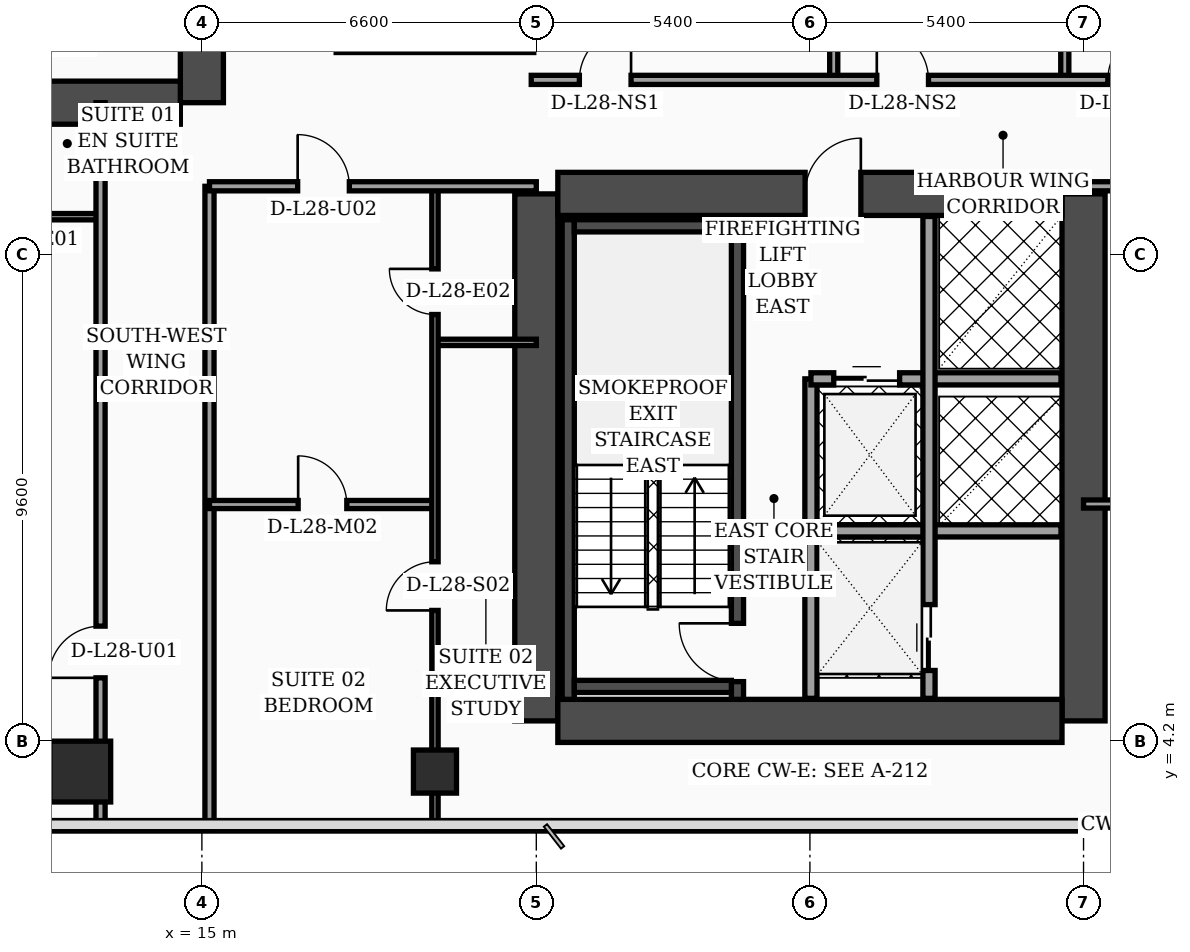
"""IFC4 building model, lengths in metres.
Left out: names, types, materials, properties, quantities, classifications, styles, units other than length and angle.
Written with IfcOpenShell. Run it as: python <this file> out.ifc"""

import sys

from ifc_helpers import new_model, si_unit, direction, frame, frame_2d, origin, origin_2d, place, context, subcontext, project, spatial, rectangle, hollow_rectangle, extrude, element, fill, save


model = new_model("IFC4")
c1 = context("Model", 3, precision=1e-05, world=origin(), true_north=direction((0.0, 1.0)))
c2 = subcontext(c1, "Body", "Model", "MODEL_VIEW")
j1 = project(units=[si_unit("LENGTHUNIT", "METRE"), si_unit("PLANEANGLEUNIT", "RADIAN")], contexts=[c1])
p1 = place(None, origin())
s1 = spatial("IfcSite", under=j1, at=p1, CompositionType="ELEMENT")
p2 = place(p1, origin())
s2 = spatial("IfcBuilding", under=s1, at=p2, CompositionType="ELEMENT")
p3 = place(p2, frame((0.0, 0.0, 116.4)))
s3 = spatial("IfcBuildingStorey", under=s2, at=p3, CompositionType="ELEMENT", Elevation=116.4)
p4 = place(p3, frame((15.0, 16.8, 0.0), z_axis=(0.0, 0.0, 1.0), x_axis=(0.0, 1.0, 0.0)))
e1 = element("IfcWall", 1, at=p4, inside=s3, PredefinedType="SHEAR", context=c2, shape_type="SweptSolid", body=[
    extrude(rectangle(XDim=21.6, YDim=0.85, at=frame_2d((10.8, 0.0))), origin(), (0.0, 0.0, 1.0), 3.56),
])
p5 = place(p4, frame((8.65, 0.0, 0.0)))
e2 = element("IfcOpeningElement", 2, at=p5, cuts=e1, PredefinedType="OPENING", context=c2, shape_type="SweptSolid", body=[
    extrude(rectangle(XDim=1.1, YDim=2.2, at=frame_2d((0.55, 1.1))), frame((0.0, 0.435, 0.0), z_axis=(0.0, -1.0, 0.0), x_axis=(1.0, 0.0, 0.0)), (0.0, 0.0, 1.0), 0.87),
])
p6 = place(p4, frame((10.85, 0.0, 0.0)))
e3 = element("IfcOpeningElement", 3, at=p6, cuts=e1, PredefinedType="OPENING", context=c2, shape_type="SweptSolid", body=[
    extrude(rectangle(XDim=1.1, YDim=2.2, at=frame_2d((0.55, 1.1))), frame((0.0, 0.435, 0.0), z_axis=(0.0, -1.0, 0.0), x_axis=(1.0, 0.0, 0.0)), (0.0, 0.0, 1.0), 0.87),
])
p7 = place(p4, frame((13.5, 0.0, 0.0)))
e4 = element("IfcOpeningElement", 4, at=p7, cuts=e1, PredefinedType="OPENING", context=c2, shape_type="SweptSolid", body=[
    extrude(rectangle(XDim=1.1, YDim=2.2, at=frame_2d((0.55, 1.1))), frame((0.0, 0.435, 0.0), z_axis=(0.0, -1.0, 0.0), x_axis=(1.0, 0.0, 0.0)), (0.0, 0.0, 1.0), 0.87),
])
p8 = place(p4, frame((16.15, 0.0, 0.0)))
e5 = element("IfcOpeningElement", 5, at=p8, cuts=e1, PredefinedType="OPENING", context=c2, shape_type="SweptSolid", body=[
    extrude(rectangle(XDim=1.1, YDim=2.2, at=frame_2d((0.55, 1.1))), frame((0.0, 0.435, 0.0), z_axis=(0.0, -1.0, 0.0), x_axis=(1.0, 0.0, 0.0)), (0.0, 0.0, 1.0), 0.87),
])
p9 = place(p3, frame((4.625, 16.8, 0.0), z_axis=(0.0, 0.0, 1.0), x_axis=(1.0, 0.0, 0.0)))
e6 = element("IfcWall", 6, at=p9, inside=s3, PredefinedType="SHEAR", context=c2, shape_type="SweptSolid", body=[
    extrude(rectangle(XDim=9.95, YDim=0.85, at=frame_2d((4.975, 0.0))), origin(), (0.0, 0.0, 1.0), 3.56),
])
for number, where, z_axis, x_axis in (
    (7, (21.6, 4.6, 0.0), (0.0, 0.0, 1.0), (0.0, 1.0, 0.0)),
    (8, (32.4, 4.6, 0.0), (0.0, 0.0, 1.0), (0.0, 1.0, 0.0)),
):
    element("IfcWall", number, at=place(p3, frame(where, z_axis=z_axis, x_axis=x_axis)), inside=s3, PredefinedType="SHEAR", context=c2, shape_type="SweptSolid", body=[
        extrude(rectangle(XDim=10.4, YDim=0.85, at=frame_2d((5.2, 0.0))), origin(), (0.0, 0.0, 1.0), 3.56),
    ])
p10 = place(p3, frame((22.025, 15.0, 0.0), z_axis=(0.0, 0.0, 1.0), x_axis=(1.0, 0.0, 0.0)))
e9 = element("IfcWall", 9, at=p10, inside=s3, PredefinedType="SHEAR", context=c2, shape_type="SweptSolid", body=[
    extrude(rectangle(XDim=9.95, YDim=0.85, at=frame_2d((4.975, 0.0))), origin(), (0.0, 0.0, 1.0), 3.56),
])
p11 = place(p10, frame((4.88, 0.0, 0.0)))
e10 = element("IfcOpeningElement", 10, at=p11, cuts=e9, PredefinedType="OPENING", context=c2, shape_type="SweptSolid", body=[
    extrude(rectangle(XDim=1.1, YDim=2.2, at=frame_2d((0.55, 1.1))), frame((0.0, 0.435, 0.0), z_axis=(0.0, -1.0, 0.0), x_axis=(1.0, 0.0, 0.0)), (0.0, 0.0, 1.0), 0.87),
])
p12 = place(p3, frame((22.025, 4.6, 0.0), z_axis=(0.0, 0.0, 1.0), x_axis=(1.0, 0.0, 0.0)))
e11 = element("IfcWall", 11, at=p12, inside=s3, PredefinedType="SHEAR", context=c2, shape_type="SweptSolid", body=[
    extrude(rectangle(XDim=9.95, YDim=0.85, at=frame_2d((4.975, 0.0))), origin(), (0.0, 0.0, 1.0), 3.56),
])
p13 = place(p3, frame((22.23, 5.025, 0.0), z_axis=(0.0, 0.0, 1.0), x_axis=(0.0, 1.0, 0.0)))
e12 = element("IfcWall", 12, at=p13, inside=s3, PredefinedType="SOLIDWALL", context=c2, shape_type="SweptSolid", body=[
    extrude(rectangle(XDim=9.465, YDim=0.24, at=frame_2d((4.732, 0.0))), origin(), (0.0, 0.0, 1.0), 3.56),
])
p14 = place(p3, frame((25.57, 5.025, 0.0), z_axis=(0.0, 0.0, 1.0), x_axis=(0.0, 1.0, 0.0)))
e13 = element("IfcWall", 13, at=p14, inside=s3, PredefinedType="SOLIDWALL", context=c2, shape_type="SweptSolid", body=[
    extrude(rectangle(XDim=9.465, YDim=0.24, at=frame_2d((4.732, 0.0))), origin(), (0.0, 0.0, 1.0), 3.56),
])
p15 = place(p14, frame((0.35, 0.0, 0.0)))
e14 = element("IfcOpeningElement", 14, at=p15, cuts=e13, PredefinedType="OPENING", context=c2, shape_type="SweptSolid", body=[
    extrude(rectangle(XDim=1.15, YDim=2.2, at=frame_2d((0.575, 1.1))), frame((0.0, 0.13, 0.0), z_axis=(0.0, -1.0, 0.0), x_axis=(1.0, 0.0, 0.0)), (0.0, 0.0, 1.0), 0.26),
])
for number, where, z_axis, x_axis in (
    (15, (22.35, 5.28, 0.0), (0.0, 0.0, 1.0), (1.0, 0.0, 0.0)),
    (16, (22.35, 14.37, 0.0), (0.0, 0.0, 1.0), (1.0, 0.0, 0.0)),
):
    element("IfcWall", number, at=place(p3, frame(where, z_axis=z_axis, x_axis=x_axis)), inside=s3, PredefinedType="SOLIDWALL", context=c2, shape_type="SweptSolid", body=[
        extrude(rectangle(XDim=3.1, YDim=0.24, at=frame_2d((1.55, 0.0))), origin(), (0.0, 0.0, 1.0), 3.56),
    ])
p16 = place(p3, frame((12.6, 3.6, 0.0), z_axis=(0.0, 0.0, 1.0), x_axis=(1.0, 0.0, 0.0)))
e17 = element("IfcColumn", 17, at=p16, inside=s3, PredefinedType="COLUMN", context=c2, shape_type="SweptSolid", body=[
    extrude(rectangle(XDim=1.2, YDim=1.2, at=origin_2d()), origin(), (0.0, 0.0, 1.0), 3.56),
])
p17 = place(p3, frame((19.6, 3.6, 0.0), z_axis=(0.0, 0.0, 1.0), x_axis=(1.0, 0.0, 0.0)))
e18 = element("IfcColumn", 18, at=p17, inside=s3, PredefinedType="COLUMN", context=c2, shape_type="SweptSolid", body=[
    extrude(hollow_rectangle(XDim=0.85, YDim=0.85, WallThickness=0.036, at=origin_2d()), origin(), (0.0, 0.0, 1.0), 3.56),
])
p18 = place(p3, frame((27.02, 5.045, 0.0), z_axis=(0.0, 0.0, 1.0), x_axis=(0.0, 1.0, 0.0)))
e19 = element("IfcWall", 19, at=p18, inside=s3, PredefinedType="SOLIDWALL", context=c2, shape_type="SweptSolid", body=[
    extrude(rectangle(XDim=6.305, YDim=0.24, at=frame_2d((3.153, 0.0))), origin(), (0.0, 0.0, 1.0), 3.56),
])
p19 = place(p3, frame((27.02, 11.35, 0.0), z_axis=(0.0, 0.0, 1.0), x_axis=(1.0, 0.0, 0.0)))
e20 = element("IfcWall", 20, at=p19, inside=s3, PredefinedType="SOLIDWALL", context=c2, shape_type="SweptSolid", body=[
    extrude(rectangle(XDim=4.935, YDim=0.24, at=frame_2d((2.468, 0.0))), origin(), (0.0, 0.0, 1.0), 3.56),
])
p20 = place(p19, frame((0.45, 0.0, 0.0)))
e21 = element("IfcOpeningElement", 21, at=p20, cuts=e20, PredefinedType="OPENING", context=c2, shape_type="SweptSolid", body=[
    extrude(rectangle(XDim=1.3, YDim=2.35, at=frame_2d((0.65, 1.175))), frame((0.0, 0.13, 0.0), z_axis=(0.0, -1.0, 0.0), x_axis=(1.0, 0.0, 0.0)), (0.0, 0.0, 1.0), 0.26),
])
p21 = place(p3, frame((27.02, 8.35, 0.0), z_axis=(0.0, 0.0, 1.0), x_axis=(1.0, 0.0, 0.0)))
e22 = element("IfcWall", 22, at=p21, inside=s3, PredefinedType="SOLIDWALL", context=c2, shape_type="SweptSolid", body=[
    extrude(rectangle(XDim=4.935, YDim=0.24, at=frame_2d((2.468, 0.0))), origin(), (0.0, 0.0, 1.0), 3.09),
])
p22 = place(p3, frame((29.35, 5.045, 0.0), z_axis=(0.0, 0.0, 1.0), x_axis=(0.0, 1.0, 0.0)))
e23 = element("IfcWall", 23, at=p22, inside=s3, PredefinedType="SOLIDWALL", context=c2, shape_type="SweptSolid", body=[
    extrude(rectangle(XDim=9.51, YDim=0.24, at=frame_2d((4.755, 0.0))), origin(), (0.0, 0.0, 1.0), 3.56),
])
p23 = place(p22, frame((0.55, 0.0, 0.0)))
e24 = element("IfcOpeningElement", 24, at=p23, cuts=e23, PredefinedType="OPENING", context=c2, shape_type="SweptSolid", body=[
    extrude(rectangle(XDim=1.3, YDim=2.35, at=frame_2d((0.65, 1.175))), frame((0.0, 0.13, 0.0), z_axis=(0.0, -1.0, 0.0), x_axis=(1.0, 0.0, 0.0)), (0.0, 0.0, 1.0), 0.26),
])
p24 = place(p3, frame((3.2, 14.55, 0.0), z_axis=(0.0, 0.0, 1.0), x_axis=(1.0, 0.0, 0.0)))
e25 = element("IfcWall", 25, at=p24, inside=s3, PredefinedType="PARTITIONING", context=c2, shape_type="SweptSolid", body=[
    extrude(rectangle(XDim=9.8, YDim=0.125, at=frame_2d((4.9, 0.0))), origin(), (0.0, 0.0, 1.0), 2.84),
])
p25 = place(p24, frame((3.32, 0.0, 0.0)))
e26 = element("IfcOpeningElement", 26, at=p25, cuts=e25, PredefinedType="OPENING", context=c2, shape_type="SweptSolid", body=[
    extrude(rectangle(XDim=0.96, YDim=2.2, at=frame_2d((0.48, 1.1))), frame((0.0, 0.073, 0.0), z_axis=(0.0, -1.0, 0.0), x_axis=(1.0, 0.0, 0.0)), (0.0, 0.0, 1.0), 0.145),
])
p26 = place(p24, frame((7.89, 0.0, 0.0)))
e27 = element("IfcOpeningElement", 27, at=p26, cuts=e25, PredefinedType="OPENING", context=c2, shape_type="SweptSolid", body=[
    extrude(rectangle(XDim=0.9, YDim=2.15, at=frame_2d((0.45, 1.075))), frame((0.0, 0.073, 0.0), z_axis=(0.0, -1.0, 0.0), x_axis=(1.0, 0.0, 0.0)), (0.0, 0.0, 1.0), 0.145),
])
p27 = place(p3, frame((13.0, 2.44, 0.0), z_axis=(0.0, 0.0, 1.0), x_axis=(0.0, 1.0, 0.0)))
e28 = element("IfcWall", 28, at=p27, inside=s3, PredefinedType="PARTITIONING", context=c2, shape_type="SweptSolid", body=[
    extrude(rectangle(XDim=14.36, YDim=0.18, at=frame_2d((7.18, 0.0))), origin(), (0.0, 0.0, 1.0), 2.84),
])
p28 = place(p27, frame((3.01, 0.0, 0.0)))
e29 = element("IfcOpeningElement", 29, at=p28, cuts=e28, PredefinedType="OPENING", context=c2, shape_type="SweptSolid", body=[
    extrude(rectangle(XDim=1.02, YDim=2.2, at=frame_2d((0.51, 1.1))), frame((0.0, 0.1, 0.0), z_axis=(0.0, -1.0, 0.0), x_axis=(1.0, 0.0, 0.0)), (0.0, 0.0, 1.0), 0.2),
])
p29 = place(p3, frame((15.15, 2.44, 0.0), z_axis=(0.0, 0.0, 1.0), x_axis=(0.0, 1.0, 0.0)))
e30 = element("IfcWall", 30, at=p29, inside=s3, PredefinedType="PARTITIONING", context=c2, shape_type="SweptSolid", body=[
    extrude(rectangle(XDim=12.71, YDim=0.18, at=frame_2d((6.355, 0.0))), origin(), (0.0, 0.0, 1.0), 3.04),
])
p30 = place(p3, frame((19.6, 12.07, 0.0), z_axis=(0.0, 0.0, 1.0), x_axis=(1.0, 0.0, 0.0)))
e31 = element("IfcWall", 31, at=p30, inside=s3, PredefinedType="PARTITIONING", context=c2, shape_type="SweptSolid", body=[
    extrude(rectangle(XDim=2.0, YDim=0.125, at=frame_2d((1.0, 0.0))), origin(), (0.0, 0.0, 1.0), 3.56),
])
p31 = place(p3, frame((15.15, 8.87, 0.0), z_axis=(0.0, 0.0, 1.0), x_axis=(1.0, 0.0, 0.0)))
e32 = element("IfcWall", 32, at=p31, inside=s3, PredefinedType="PARTITIONING", context=c2, shape_type="SweptSolid", body=[
    extrude(rectangle(XDim=4.45, YDim=0.16, at=frame_2d((2.225, 0.0))), origin(), (0.0, 0.0, 1.0), 3.56),
])
p32 = place(p31, frame((1.75, 0.0, 0.0)))
e33 = element("IfcOpeningElement", 33, at=p32, cuts=e32, PredefinedType="OPENING", context=c2, shape_type="SweptSolid", body=[
    extrude(rectangle(XDim=0.96, YDim=2.2, at=frame_2d((0.48, 1.1))), frame((0.0, 0.09, 0.0), z_axis=(0.0, -1.0, 0.0), x_axis=(1.0, 0.0, 0.0)), (0.0, 0.0, 1.0), 0.18),
])
p33 = place(p3, frame((19.6, 2.44, 0.0), z_axis=(0.0, 0.0, 1.0), x_axis=(0.0, 1.0, 0.0)))
e34 = element("IfcWall", 34, at=p33, inside=s3, PredefinedType="PARTITIONING", context=c2, shape_type="SweptSolid", body=[
    extrude(rectangle(XDim=12.71, YDim=0.125, at=frame_2d((6.355, 0.0))), origin(), (0.0, 0.0, 1.0), 2.49),
])
p34 = place(p33, frame((4.34, 0.0, 0.0)))
e35 = element("IfcOpeningElement", 35, at=p34, cuts=e34, PredefinedType="OPENING", context=c2, shape_type="SweptSolid", body=[
    extrude(rectangle(XDim=0.96, YDim=2.2, at=frame_2d((0.48, 1.1))), frame((0.0, 0.073, 0.0), z_axis=(0.0, -1.0, 0.0), x_axis=(1.0, 0.0, 0.0)), (0.0, 0.0, 1.0), 0.145),
])
p35 = place(p33, frame((10.18, 0.0, 0.0)))
e36 = element("IfcOpeningElement", 36, at=p35, cuts=e34, PredefinedType="OPENING", context=c2, shape_type="SweptSolid", body=[
    extrude(rectangle(XDim=0.9, YDim=2.15, at=frame_2d((0.45, 1.075))), frame((0.0, 0.073, 0.0), z_axis=(0.0, -1.0, 0.0), x_axis=(1.0, 0.0, 0.0)), (0.0, 0.0, 1.0), 0.145),
])
p36 = place(p3, frame((15.15, 15.15, 0.0), z_axis=(0.0, 0.0, 1.0), x_axis=(1.0, 0.0, 0.0)))
e37 = element("IfcWall", 37, at=p36, inside=s3, PredefinedType="PARTITIONING", context=c2, shape_type="SweptSolid", body=[
    extrude(rectangle(XDim=6.45, YDim=0.18, at=frame_2d((3.225, 0.0))), origin(), (0.0, 0.0, 1.0), 2.49),
])
p37 = place(p36, frame((1.74, 0.0, 0.0)))
e38 = element("IfcOpeningElement", 38, at=p37, cuts=e37, PredefinedType="OPENING", context=c2, shape_type="SweptSolid", body=[
    extrude(rectangle(XDim=1.02, YDim=2.2, at=frame_2d((0.51, 1.1))), frame((0.0, 0.1, 0.0), z_axis=(0.0, -1.0, 0.0), x_axis=(1.0, 0.0, 0.0)), (0.0, 0.0, 1.0), 0.2),
])
p38 = place(p3, frame((17.65, 17.88, 0.0), z_axis=(0.0, 0.0, 1.0), x_axis=(1.0, 0.0, 0.0)))
e39 = element("IfcWall", 39, at=p38, inside=s3, PredefinedType="PARTITIONING", context=c2, shape_type="SweptSolid", body=[
    extrude(rectangle(XDim=3.9, YDim=0.18, at=frame_2d((1.95, 0.0))), origin(), (0.0, 0.0, 1.0), 3.56),
])
p39 = place(p3, frame((32.4, 8.88, 0.0), z_axis=(0.0, 0.0, 1.0), x_axis=(1.0, 0.0, 0.0)))
e40 = element("IfcWall", 40, at=p39, inside=s3, PredefinedType="PARTITIONING", context=c2, shape_type="SweptSolid", body=[
    extrude(rectangle(XDim=5.2, YDim=0.16, at=frame_2d((2.6, 0.0))), origin(), (0.0, 0.0, 1.0), 2.84),
])
p40 = place(p39, frame((2.12, 0.0, 0.0)))
e41 = element("IfcOpeningElement", 41, at=p40, cuts=e40, PredefinedType="OPENING", context=c2, shape_type="SweptSolid", body=[
    extrude(rectangle(XDim=0.96, YDim=2.2, at=frame_2d((0.48, 1.1))), frame((0.0, 0.09, 0.0), z_axis=(0.0, -1.0, 0.0), x_axis=(1.0, 0.0, 0.0)), (0.0, 0.0, 1.0), 0.18),
])
p41 = place(p3, frame((32.4, 15.15, 0.0), z_axis=(0.0, 0.0, 1.0), x_axis=(1.0, 0.0, 0.0)))
e42 = element("IfcWall", 42, at=p41, inside=s3, PredefinedType="PARTITIONING", context=c2, shape_type="SweptSolid", body=[
    extrude(rectangle(XDim=7.2, YDim=0.18, at=frame_2d((3.6, 0.0))), origin(), (0.0, 0.0, 1.0), 2.84),
])
p42 = place(p41, frame((2.19, 0.0, 0.0)))
e43 = element("IfcOpeningElement", 43, at=p42, cuts=e42, PredefinedType="OPENING", context=c2, shape_type="SweptSolid", body=[
    extrude(rectangle(XDim=1.02, YDim=2.2, at=frame_2d((0.51, 1.1))), frame((0.0, 0.1, 0.0), z_axis=(0.0, -1.0, 0.0), x_axis=(1.0, 0.0, 0.0)), (0.0, 0.0, 1.0), 0.2),
])
p43 = place(p3, frame((27.47, 17.25, 0.0), z_axis=(0.0, 0.0, 1.0), x_axis=(0.0, 1.0, 0.0)))
e44 = element("IfcWall", 44, at=p43, inside=s3, PredefinedType="PARTITIONING", context=c2, shape_type="SweptSolid", body=[
    extrude(rectangle(XDim=10.5, YDim=0.16, at=frame_2d((5.25, 0.0))), origin(), (0.0, 0.0, 1.0), 2.84),
])
p44 = place(p3, frame((32.03, 17.25, 0.0), z_axis=(0.0, 0.0, 1.0), x_axis=(0.0, 1.0, 0.0)))
e45 = element("IfcWall", 45, at=p44, inside=s3, PredefinedType="PARTITIONING", context=c2, shape_type="SweptSolid", body=[
    extrude(rectangle(XDim=13.04, YDim=0.16, at=frame_2d((6.52, 0.0))), origin(), (0.0, 0.0, 1.0), 2.84),
])
p45 = place(p3, frame((21.5, 17.25, 0.0), z_axis=(0.0, 0.0, 1.0), x_axis=(1.0, 0.0, 0.0)))
e46 = element("IfcWall", 46, at=p45, inside=s3, PredefinedType="PARTITIONING", context=c2, shape_type="SweptSolid", body=[
    extrude(rectangle(XDim=15.75, YDim=0.18, at=frame_2d((7.875, 0.0))), origin(), (0.0, 0.0, 1.0), 2.84),
])
p46 = place(p45, frame((0.95, 0.0, 0.0)))
e47 = element("IfcOpeningElement", 47, at=p46, cuts=e46, PredefinedType="OPENING", context=c2, shape_type="SweptSolid", body=[
    extrude(rectangle(XDim=1.02, YDim=2.2, at=frame_2d((0.51, 1.1))), frame((0.0, 0.1, 0.0), z_axis=(0.0, -1.0, 0.0), x_axis=(1.0, 0.0, 0.0)), (0.0, 0.0, 1.0), 0.2),
])
p47 = place(p45, frame((6.82, 0.0, 0.0)))
e48 = element("IfcOpeningElement", 48, at=p47, cuts=e46, PredefinedType="OPENING", context=c2, shape_type="SweptSolid", body=[
    extrude(rectangle(XDim=1.02, YDim=2.2, at=frame_2d((0.51, 1.1))), frame((0.0, 0.1, 0.0), z_axis=(0.0, -1.0, 0.0), x_axis=(1.0, 0.0, 0.0)), (0.0, 0.0, 1.0), 0.2),
])
p48 = place(p45, frame((11.38, 0.0, 0.0)))
e49 = element("IfcOpeningElement", 49, at=p48, cuts=e46, PredefinedType="OPENING", context=c2, shape_type="SweptSolid", body=[
    extrude(rectangle(XDim=1.02, YDim=2.2, at=frame_2d((0.51, 1.1))), frame((0.0, 0.1, 0.0), z_axis=(0.0, -1.0, 0.0), x_axis=(1.0, 0.0, 0.0)), (0.0, 0.0, 1.0), 0.2),
])
p49 = place(p20, origin())
e50 = element("IfcDoor", 50, at=p49, inside=s3, OperationType="DOUBLE_DOOR_SLIDING", PredefinedType="DOOR", context=c2, shape_type="SweptSolid", body=[
    extrude(rectangle(XDim=1.3, YDim=2.35, at=frame_2d((0.65, 1.175))), frame((0.0, 0.025, 0.0), z_axis=(0.0, -1.0, 0.0), x_axis=(1.0, 0.0, 0.0)), (0.0, 0.0, 1.0), 0.05),
])
fill(e21, e50)
p50 = place(p23, origin())
e51 = element("IfcDoor", 51, at=p50, inside=s3, OperationType="DOUBLE_DOOR_SLIDING", PredefinedType="DOOR", context=c2, shape_type="SweptSolid", body=[
    extrude(rectangle(XDim=1.3, YDim=2.35, at=frame_2d((0.65, 1.175))), frame((0.0, 0.025, 0.0), z_axis=(0.0, -1.0, 0.0), x_axis=(1.0, 0.0, 0.0)), (0.0, 0.0, 1.0), 0.05),
])
fill(e24, e51)
p51 = place(p28, origin())
e52 = element("IfcDoor", 52, at=p51, inside=s3, OperationType="SINGLE_SWING_LEFT", PredefinedType="DOOR", context=c2, shape_type="SweptSolid", body=[
    extrude(rectangle(XDim=1.02, YDim=2.2, at=frame_2d((0.51, 1.1))), frame((0.0, 0.025, 0.0), z_axis=(0.0, -1.0, 0.0), x_axis=(1.0, 0.0, 0.0)), (0.0, 0.0, 1.0), 0.05),
])
fill(e29, e52)
p52 = place(p32, origin())
e53 = element("IfcDoor", 53, at=p52, inside=s3, OperationType="SINGLE_SWING_LEFT", PredefinedType="DOOR", context=c2, shape_type="SweptSolid", body=[
    extrude(rectangle(XDim=0.96, YDim=2.2, at=frame_2d((0.48, 1.1))), frame((0.0, 0.025, 0.0), z_axis=(0.0, -1.0, 0.0), x_axis=(1.0, 0.0, 0.0)), (0.0, 0.0, 1.0), 0.05),
])
fill(e33, e53)
p53 = place(p34, origin())
e54 = element("IfcDoor", 54, at=p53, inside=s3, OperationType="SINGLE_SWING_LEFT", PredefinedType="DOOR", context=c2, shape_type="SweptSolid", body=[
    extrude(rectangle(XDim=0.96, YDim=2.2, at=frame_2d((0.48, 1.1))), frame((0.0, 0.025, 0.0), z_axis=(0.0, -1.0, 0.0), x_axis=(1.0, 0.0, 0.0)), (0.0, 0.0, 1.0), 0.05),
])
fill(e35, e54)
p54 = place(p35, origin())
e55 = element("IfcDoor", 55, at=p54, inside=s3, OperationType="SINGLE_SWING_RIGHT", PredefinedType="DOOR", context=c2, shape_type="SweptSolid", body=[
    extrude(rectangle(XDim=0.9, YDim=2.15, at=frame_2d((0.45, 1.075))), frame((0.0, 0.025, 0.0), z_axis=(0.0, -1.0, 0.0), x_axis=(1.0, 0.0, 0.0)), (0.0, 0.0, 1.0), 0.05),
])
fill(e36, e55)
p55 = place(p37, origin())
e56 = element("IfcDoor", 56, at=p55, inside=s3, OperationType="SINGLE_SWING_LEFT", PredefinedType="DOOR", context=c2, shape_type="SweptSolid", body=[
    extrude(rectangle(XDim=1.02, YDim=2.2, at=frame_2d((0.51, 1.1))), frame((0.0, 0.025, 0.0), z_axis=(0.0, -1.0, 0.0), x_axis=(1.0, 0.0, 0.0)), (0.0, 0.0, 1.0), 0.05),
])
fill(e38, e56)
p56 = place(p46, origin())
e57 = element("IfcDoor", 57, at=p56, inside=s3, OperationType="SINGLE_SWING_RIGHT", PredefinedType="DOOR", context=c2, shape_type="SweptSolid", body=[
    extrude(rectangle(XDim=1.02, YDim=2.2, at=frame_2d((0.51, 1.1))), frame((0.0, 0.025, 0.0), z_axis=(0.0, -1.0, 0.0), x_axis=(1.0, 0.0, 0.0)), (0.0, 0.0, 1.0), 0.05),
])
fill(e47, e57)
p57 = place(p47, origin())
e58 = element("IfcDoor", 58, at=p57, inside=s3, OperationType="SINGLE_SWING_LEFT", PredefinedType="DOOR", context=c2, shape_type="SweptSolid", body=[
    extrude(rectangle(XDim=1.02, YDim=2.2, at=frame_2d((0.51, 1.1))), frame((0.0, 0.025, 0.0), z_axis=(0.0, -1.0, 0.0), x_axis=(1.0, 0.0, 0.0)), (0.0, 0.0, 1.0), 0.05),
])
fill(e48, e58)
p58 = place(p48, origin())
e59 = element("IfcDoor", 59, at=p58, inside=s3, OperationType="SINGLE_SWING_RIGHT", PredefinedType="DOOR", context=c2, shape_type="SweptSolid", body=[
    extrude(rectangle(XDim=1.02, YDim=2.2, at=frame_2d((0.51, 1.1))), frame((0.0, 0.025, 0.0), z_axis=(0.0, -1.0, 0.0), x_axis=(1.0, 0.0, 0.0)), (0.0, 0.0, 1.0), 0.05),
])
fill(e49, e59)
p59 = place(p15, origin())
e60 = element("IfcDoor", 60, at=p59, inside=s3, OperationType="SINGLE_SWING_RIGHT", PredefinedType="DOOR", context=c2, shape_type="SweptSolid", body=[
    extrude(rectangle(XDim=1.15, YDim=2.2, at=frame_2d((0.575, 1.1))), frame((0.0, 0.025, 0.0), z_axis=(0.0, -1.0, 0.0), x_axis=(1.0, 0.0, 0.0)), (0.0, 0.0, 1.0), 0.05),
])
fill(e14, e60)
p60 = place(p11, origin())
e61 = element("IfcDoor", 61, at=p60, inside=s3, OperationType="SINGLE_SWING_RIGHT", PredefinedType="DOOR", context=c2, shape_type="SweptSolid", body=[
    extrude(rectangle(XDim=1.1, YDim=2.2, at=frame_2d((0.55, 1.1))), frame((0.0, 0.025, 0.0), z_axis=(0.0, -1.0, 0.0), x_axis=(1.0, 0.0, 0.0)), (0.0, 0.0, 1.0), 0.05),
])
fill(e10, e61)
save(model, sys.argv[1])
